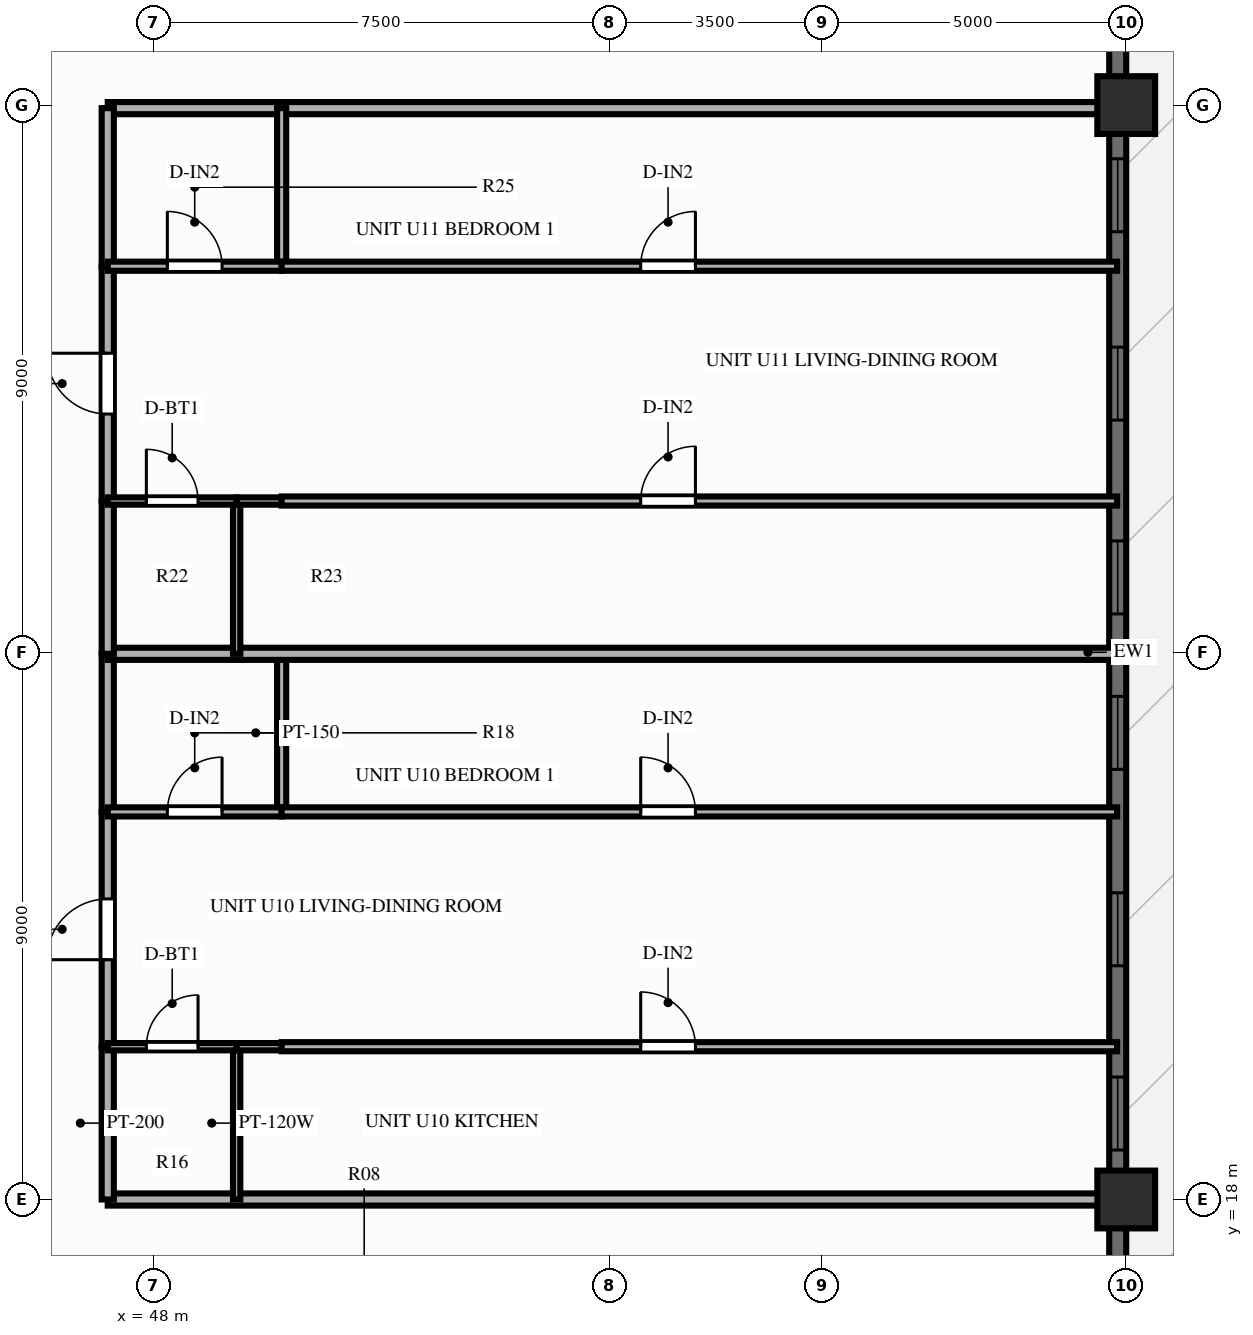
"""IFC4 building model, lengths in metres.
Left out: names, types, materials, properties, quantities, classifications, styles, units other than length and angle.
Written with IfcOpenShell. Run it as: python <this file> out.ifc"""

import sys

from ifc_helpers import new_model, si_unit, direction, frame, frame_2d, origin, origin_2d, place, context, subcontext, project, spatial, rectangle, extrude, source, transform, mapped, element, fill, save


model = new_model("IFC4")
c1 = context("Model", 3, precision=1e-05, world=origin(), true_north=direction((0.0, 1.0)))
c2 = subcontext(c1, "Body", "Model", "MODEL_VIEW")
j1 = project(units=[si_unit("LENGTHUNIT", "METRE"), si_unit("PLANEANGLEUNIT", "RADIAN")], contexts=[c1])
p1 = place(None, origin())
s1 = spatial("IfcSite", under=j1, at=p1, CompositionType="ELEMENT")
p2 = place(p1, origin())
s2 = spatial("IfcBuilding", under=s1, at=p2, CompositionType="ELEMENT")
p3 = place(p2, frame((0.0, 0.0, 80.85)))
s3 = spatial("IfcBuildingStorey", under=s2, at=p3, CompositionType="ELEMENT", Elevation=80.85)
m1 = source(origin(), c2, "Body", "SweptSolid", [
    extrude(rectangle(XDim=0.95, YDim=0.95, at=origin_2d()), origin(), (0.0, 0.0, 1.0), 3.0),
])
for number, where, z_axis, x_axis in (
    (1, (64.0, 18.0, 0.0), (0.0, 0.0, 1.0), (1.0, 0.0, 0.0)),
    (2, (64.0, 36.0, 0.0), (0.0, 0.0, 1.0), (1.0, 0.0, 0.0)),
):
    element("IfcColumn", number, at=place(p3, frame(where, z_axis=z_axis, x_axis=x_axis)), inside=s3, PredefinedType="COLUMN", context=c2, shape_type="MappedRepresentation", body=[
        mapped(m1, transform((0.0, 0.0, 0.0), scale=1.0)),
    ])
p4 = place(p3, frame((63.86, 7.2, 0.0), z_axis=(0.0, 0.0, 1.0), x_axis=(0.0, 1.0, 0.0)))
e3 = element("IfcWall", 3, at=p4, inside=s3, PredefinedType="SOLIDWALL", context=c2, shape_type="SweptSolid", body=[
    extrude(rectangle(XDim=39.6, YDim=0.28, at=frame_2d((19.8, 0.0))), origin(), (0.0, 0.0, 1.0), 2.28),
])
p5 = place(p4, frame((6.2, 0.0, 0.0), z_axis=(0.0, 0.0, 1.0), x_axis=(-1.0, 0.0, 0.0)))
e4 = element("IfcOpeningElement", 4, at=p5, cuts=e3, PredefinedType="OPENING", context=c2, shape_type="SweptSolid", body=[
    extrude(rectangle(XDim=1.6, YDim=2.15, at=frame_2d((0.8, 1.075))), frame((0.0, 0.152, 0.0), z_axis=(0.0, -1.0, 0.0), x_axis=(1.0, 0.0, 0.0)), (0.0, 0.0, 1.0), 0.304),
])
p6 = place(p4, frame((11.614, 0.0, 0.25)))
e5 = element("IfcOpeningElement", 5, at=p6, cuts=e3, PredefinedType="OPENING", context=c2, shape_type="SweptSolid", body=[
    extrude(rectangle(XDim=1.2, YDim=1.5, at=frame_2d((0.6, 0.75))), frame((0.0, 0.152, 0.0), z_axis=(0.0, -1.0, 0.0), x_axis=(1.0, 0.0, 0.0)), (0.0, 0.0, 1.0), 0.304),
])
p7 = place(p4, frame((14.644, 0.0, 0.25)))
e6 = element("IfcOpeningElement", 6, at=p7, cuts=e3, PredefinedType="OPENING", context=c2, shape_type="SweptSolid", body=[
    extrude(rectangle(XDim=1.2, YDim=1.5, at=frame_2d((0.6, 0.75))), frame((0.0, 0.152, 0.0), z_axis=(0.0, -1.0, 0.0), x_axis=(1.0, 0.0, 0.0)), (0.0, 0.0, 1.0), 0.304),
])
p8 = place(p4, frame((17.875, 0.0, 0.25)))
e7 = element("IfcOpeningElement", 7, at=p8, cuts=e3, PredefinedType="OPENING", context=c2, shape_type="SweptSolid", body=[
    extrude(rectangle(XDim=1.2, YDim=1.5, at=frame_2d((0.6, 0.75))), frame((0.0, 0.152, 0.0), z_axis=(0.0, -1.0, 0.0), x_axis=(1.0, 0.0, 0.0)), (0.0, 0.0, 1.0), 0.304),
])
p9 = place(p4, frame((20.431, 0.0, 0.25)))
e8 = element("IfcOpeningElement", 8, at=p9, cuts=e3, PredefinedType="OPENING", context=c2, shape_type="SweptSolid", body=[
    extrude(rectangle(XDim=1.2, YDim=1.5, at=frame_2d((0.6, 0.75))), frame((0.0, 0.152, 0.0), z_axis=(0.0, -1.0, 0.0), x_axis=(1.0, 0.0, 0.0)), (0.0, 0.0, 1.0), 0.304),
])
p10 = place(p4, frame((23.619, 0.0, 0.25)))
e9 = element("IfcOpeningElement", 9, at=p10, cuts=e3, PredefinedType="OPENING", context=c2, shape_type="SweptSolid", body=[
    extrude(rectangle(XDim=1.2, YDim=1.5, at=frame_2d((0.6, 0.75))), frame((0.0, 0.152, 0.0), z_axis=(0.0, -1.0, 0.0), x_axis=(1.0, 0.0, 0.0)), (0.0, 0.0, 1.0), 0.304),
])
p11 = place(p4, frame((26.718, 0.0, 0.25)))
e10 = element("IfcOpeningElement", 10, at=p11, cuts=e3, PredefinedType="OPENING", context=c2, shape_type="SweptSolid", body=[
    extrude(rectangle(XDim=1.2, YDim=1.5, at=frame_2d((0.6, 0.75))), frame((0.0, 0.152, 0.0), z_axis=(0.0, -1.0, 0.0), x_axis=(1.0, 0.0, 0.0)), (0.0, 0.0, 1.0), 0.304),
])
p12 = place(p4, frame((33.6, 0.0, 0.25)))
e11 = element("IfcOpeningElement", 11, at=p12, cuts=e3, PredefinedType="OPENING", context=c2, shape_type="SweptSolid", body=[
    extrude(rectangle(XDim=1.2, YDim=1.5, at=frame_2d((0.6, 0.75))), frame((0.0, 0.152, 0.0), z_axis=(0.0, -1.0, 0.0), x_axis=(1.0, 0.0, 0.0)), (0.0, 0.0, 1.0), 0.304),
])
for number, where, z_axis, x_axis in (
    (12, (47.25, 18.0, 0.0), (0.0, 0.0, 1.0), (1.0, 0.0, 0.0)),
    (13, (47.25, 35.95, 0.0), (0.0, 0.0, 1.0), (1.0, 0.0, 0.0)),
):
    element("IfcWall", number, at=place(p3, frame(where, z_axis=z_axis, x_axis=x_axis)), inside=s3, PredefinedType="PARTITIONING", context=c2, shape_type="SweptSolid", body=[
        extrude(rectangle(XDim=16.6, YDim=0.2, at=frame_2d((8.3, 0.0))), origin(), (0.0, 0.0, 1.0), 2.34),
    ])
p13 = place(p3, frame((47.25, 18.0, 0.0), z_axis=(0.0, 0.0, 1.0), x_axis=(0.0, 1.0, 0.0)))
e14 = element("IfcWall", 14, at=p13, inside=s3, PredefinedType="PARTITIONING", context=c2, shape_type="SweptSolid", body=[
    extrude(rectangle(XDim=2.513, YDim=0.2, at=frame_2d((1.256, 0.0))), origin(), (0.0, 0.0, 1.0), 2.79),
])
p14 = place(p3, frame((47.25, 20.513, 0.0), z_axis=(0.0, 0.0, 1.0), x_axis=(0.0, 1.0, 0.0)))
e15 = element("IfcWall", 15, at=p14, inside=s3, PredefinedType="PARTITIONING", context=c2, shape_type="SweptSolid", body=[
    extrude(rectangle(XDim=3.862, YDim=0.2, at=frame_2d((1.931, 0.0))), origin(), (0.0, 0.0, 1.0), 2.79),
])
p15 = place(p14, frame((1.431, 0.0, 0.0)))
e16 = element("IfcOpeningElement", 16, at=p15, cuts=e15, PredefinedType="OPENING", context=c2, shape_type="SweptSolid", body=[
    extrude(rectangle(XDim=1.0, YDim=2.15, at=frame_2d((0.5, 1.075))), frame((0.0, 0.112, 0.0), z_axis=(0.0, -1.0, 0.0), x_axis=(1.0, 0.0, 0.0)), (0.0, 0.0, 1.0), 0.224),
])
p16 = place(p3, frame((47.25, 24.375, 0.0), z_axis=(0.0, 0.0, 1.0), x_axis=(0.0, 1.0, 0.0)))
e17 = element("IfcWall", 17, at=p16, inside=s3, PredefinedType="PARTITIONING", context=c2, shape_type="SweptSolid", body=[
    extrude(rectangle(XDim=2.6, YDim=0.2, at=frame_2d((1.3, 0.0))), origin(), (0.0, 0.0, 1.0), 2.79),
])
p17 = place(p3, frame((49.37, 18.0, 0.0), z_axis=(0.0, 0.0, 1.0), x_axis=(0.0, 1.0, 0.0)))
e18 = element("IfcWall", 18, at=p17, inside=s3, PredefinedType="PARTITIONING", context=c2, shape_type="SweptSolid", body=[
    extrude(rectangle(XDim=2.513, YDim=0.12, at=frame_2d((1.256, 0.0))), origin(), (0.0, 0.0, 1.0), 2.79),
])
p18 = place(p3, frame((50.11, 24.375, 0.0), z_axis=(0.0, 0.0, 1.0), x_axis=(0.0, 1.0, 0.0)))
e19 = element("IfcWall", 19, at=p18, inside=s3, PredefinedType="PARTITIONING", context=c2, shape_type="SweptSolid", body=[
    extrude(rectangle(XDim=2.6, YDim=0.15, at=frame_2d((1.3, 0.0))), origin(), (0.0, 0.0, 1.0), 2.79),
])
p19 = place(p3, frame((47.25, 20.513, 0.0), z_axis=(0.0, 0.0, 1.0), x_axis=(1.0, 0.0, 0.0)))
e20 = element("IfcWall", 20, at=p19, inside=s3, PredefinedType="PARTITIONING", context=c2, shape_type="SweptSolid", body=[
    extrude(rectangle(XDim=2.12, YDim=0.12, at=frame_2d((1.06, 0.0))), origin(), (0.0, 0.0, 1.0), 2.79),
])
p20 = place(p19, frame((0.635, 0.0, 0.0)))
e21 = element("IfcOpeningElement", 21, at=p20, cuts=e20, PredefinedType="OPENING", context=c2, shape_type="SweptSolid", body=[
    extrude(rectangle(XDim=0.85, YDim=2.05, at=frame_2d((0.425, 1.025))), frame((0.0, 0.072, 0.0), z_axis=(0.0, -1.0, 0.0), x_axis=(1.0, 0.0, 0.0)), (0.0, 0.0, 1.0), 0.144),
])
p21 = place(p3, frame((49.37, 20.513, 0.0), z_axis=(0.0, 0.0, 1.0), x_axis=(1.0, 0.0, 0.0)))
e22 = element("IfcWall", 22, at=p21, inside=s3, PredefinedType="PARTITIONING", context=c2, shape_type="SweptSolid", body=[
    extrude(rectangle(XDim=0.74, YDim=0.12, at=frame_2d((0.37, 0.0))), origin(), (0.0, 0.0, 1.0), 2.79),
])
p22 = place(p3, frame((50.11, 20.513, 0.0), z_axis=(0.0, 0.0, 1.0), x_axis=(1.0, 0.0, 0.0)))
e23 = element("IfcWall", 23, at=p22, inside=s3, PredefinedType="PARTITIONING", context=c2, shape_type="SweptSolid", body=[
    extrude(rectangle(XDim=13.74, YDim=0.15, at=frame_2d((6.87, 0.0))), origin(), (0.0, 0.0, 1.0), 2.79),
])
p23 = place(p22, frame((5.905, 0.0, 0.0)))
e24 = element("IfcOpeningElement", 24, at=p23, cuts=e23, PredefinedType="OPENING", context=c2, shape_type="SweptSolid", body=[
    extrude(rectangle(XDim=0.9, YDim=2.1, at=frame_2d((0.45, 1.05))), frame((0.0, 0.087, 0.0), z_axis=(0.0, -1.0, 0.0), x_axis=(1.0, 0.0, 0.0)), (0.0, 0.0, 1.0), 0.174),
])
p24 = place(p3, frame((47.25, 24.375, 0.0), z_axis=(0.0, 0.0, 1.0), x_axis=(1.0, 0.0, 0.0)))
e25 = element("IfcWall", 25, at=p24, inside=s3, PredefinedType="PARTITIONING", context=c2, shape_type="SweptSolid", body=[
    extrude(rectangle(XDim=2.86, YDim=0.15, at=frame_2d((1.43, 0.0))), origin(), (0.0, 0.0, 1.0), 2.79),
])
p25 = place(p24, frame((0.98, 0.0, 0.0)))
e26 = element("IfcOpeningElement", 26, at=p25, cuts=e25, PredefinedType="OPENING", context=c2, shape_type="SweptSolid", body=[
    extrude(rectangle(XDim=0.9, YDim=2.1, at=frame_2d((0.45, 1.05))), frame((0.0, 0.087, 0.0), z_axis=(0.0, -1.0, 0.0), x_axis=(1.0, 0.0, 0.0)), (0.0, 0.0, 1.0), 0.174),
])
p26 = place(p3, frame((50.11, 24.375, 0.0), z_axis=(0.0, 0.0, 1.0), x_axis=(1.0, 0.0, 0.0)))
e27 = element("IfcWall", 27, at=p26, inside=s3, PredefinedType="PARTITIONING", context=c2, shape_type="SweptSolid", body=[
    extrude(rectangle(XDim=13.74, YDim=0.15, at=frame_2d((6.87, 0.0))), origin(), (0.0, 0.0, 1.0), 2.79),
])
p27 = place(p26, frame((5.905, 0.0, 0.0)))
e28 = element("IfcOpeningElement", 28, at=p27, cuts=e27, PredefinedType="OPENING", context=c2, shape_type="SweptSolid", body=[
    extrude(rectangle(XDim=0.9, YDim=2.1, at=frame_2d((0.45, 1.05))), frame((0.0, 0.087, 0.0), z_axis=(0.0, -1.0, 0.0), x_axis=(1.0, 0.0, 0.0)), (0.0, 0.0, 1.0), 0.174),
])
p28 = place(p3, frame((47.25, 26.975, 0.0), z_axis=(0.0, 0.0, 1.0), x_axis=(1.0, 0.0, 0.0)))
e29 = element("IfcWall", 29, at=p28, inside=s3, PredefinedType="PARTITIONING", context=c2, shape_type="SweptSolid", body=[
    extrude(rectangle(XDim=16.6, YDim=0.2, at=frame_2d((8.3, 0.0))), origin(), (0.0, 0.0, 1.0), 2.79),
])
p29 = place(p3, frame((47.25, 26.975, 0.0), z_axis=(0.0, 0.0, 1.0), x_axis=(0.0, 1.0, 0.0)))
e30 = element("IfcWall", 30, at=p29, inside=s3, PredefinedType="PARTITIONING", context=c2, shape_type="SweptSolid", body=[
    extrude(rectangle(XDim=2.513, YDim=0.2, at=frame_2d((1.256, 0.0))), origin(), (0.0, 0.0, 1.0), 2.79),
])
p30 = place(p3, frame((47.25, 29.488, 0.0), z_axis=(0.0, 0.0, 1.0), x_axis=(0.0, 1.0, 0.0)))
e31 = element("IfcWall", 31, at=p30, inside=s3, PredefinedType="PARTITIONING", context=c2, shape_type="SweptSolid", body=[
    extrude(rectangle(XDim=3.862, YDim=0.2, at=frame_2d((1.931, 0.0))), origin(), (0.0, 0.0, 1.0), 2.79),
])
p31 = place(p30, frame((1.431, 0.0, 0.0)))
e32 = element("IfcOpeningElement", 32, at=p31, cuts=e31, PredefinedType="OPENING", context=c2, shape_type="SweptSolid", body=[
    extrude(rectangle(XDim=1.0, YDim=2.15, at=frame_2d((0.5, 1.075))), frame((0.0, 0.112, 0.0), z_axis=(0.0, -1.0, 0.0), x_axis=(1.0, 0.0, 0.0)), (0.0, 0.0, 1.0), 0.224),
])
p32 = place(p3, frame((47.25, 33.35, 0.0), z_axis=(0.0, 0.0, 1.0), x_axis=(0.0, 1.0, 0.0)))
e33 = element("IfcWall", 33, at=p32, inside=s3, PredefinedType="PARTITIONING", context=c2, shape_type="SweptSolid", body=[
    extrude(rectangle(XDim=2.6, YDim=0.2, at=frame_2d((1.3, 0.0))), origin(), (0.0, 0.0, 1.0), 2.79),
])
p33 = place(p3, frame((49.37, 26.975, 0.0), z_axis=(0.0, 0.0, 1.0), x_axis=(0.0, 1.0, 0.0)))
e34 = element("IfcWall", 34, at=p33, inside=s3, PredefinedType="PARTITIONING", context=c2, shape_type="SweptSolid", body=[
    extrude(rectangle(XDim=2.513, YDim=0.12, at=frame_2d((1.256, 0.0))), origin(), (0.0, 0.0, 1.0), 2.79),
])
p34 = place(p3, frame((50.11, 33.35, 0.0), z_axis=(0.0, 0.0, 1.0), x_axis=(0.0, 1.0, 0.0)))
e35 = element("IfcWall", 35, at=p34, inside=s3, PredefinedType="PARTITIONING", context=c2, shape_type="SweptSolid", body=[
    extrude(rectangle(XDim=2.6, YDim=0.15, at=frame_2d((1.3, 0.0))), origin(), (0.0, 0.0, 1.0), 2.79),
])
p35 = place(p3, frame((47.25, 29.488, 0.0), z_axis=(0.0, 0.0, 1.0), x_axis=(1.0, 0.0, 0.0)))
e36 = element("IfcWall", 36, at=p35, inside=s3, PredefinedType="PARTITIONING", context=c2, shape_type="SweptSolid", body=[
    extrude(rectangle(XDim=2.12, YDim=0.12, at=frame_2d((1.06, 0.0))), origin(), (0.0, 0.0, 1.0), 2.79),
])
p36 = place(p35, frame((0.635, 0.0, 0.0)))
e37 = element("IfcOpeningElement", 37, at=p36, cuts=e36, PredefinedType="OPENING", context=c2, shape_type="SweptSolid", body=[
    extrude(rectangle(XDim=0.85, YDim=2.05, at=frame_2d((0.425, 1.025))), frame((0.0, 0.072, 0.0), z_axis=(0.0, -1.0, 0.0), x_axis=(1.0, 0.0, 0.0)), (0.0, 0.0, 1.0), 0.144),
])
p37 = place(p3, frame((49.37, 29.488, 0.0), z_axis=(0.0, 0.0, 1.0), x_axis=(1.0, 0.0, 0.0)))
e38 = element("IfcWall", 38, at=p37, inside=s3, PredefinedType="PARTITIONING", context=c2, shape_type="SweptSolid", body=[
    extrude(rectangle(XDim=0.74, YDim=0.12, at=frame_2d((0.37, 0.0))), origin(), (0.0, 0.0, 1.0), 2.79),
])
p38 = place(p3, frame((50.11, 29.488, 0.0), z_axis=(0.0, 0.0, 1.0), x_axis=(1.0, 0.0, 0.0)))
e39 = element("IfcWall", 39, at=p38, inside=s3, PredefinedType="PARTITIONING", context=c2, shape_type="SweptSolid", body=[
    extrude(rectangle(XDim=13.74, YDim=0.15, at=frame_2d((6.87, 0.0))), origin(), (0.0, 0.0, 1.0), 2.79),
])
p39 = place(p38, frame((5.905, 0.0, 0.0)))
e40 = element("IfcOpeningElement", 40, at=p39, cuts=e39, PredefinedType="OPENING", context=c2, shape_type="SweptSolid", body=[
    extrude(rectangle(XDim=0.9, YDim=2.1, at=frame_2d((0.45, 1.05))), frame((0.0, 0.087, 0.0), z_axis=(0.0, -1.0, 0.0), x_axis=(1.0, 0.0, 0.0)), (0.0, 0.0, 1.0), 0.174),
])
p40 = place(p3, frame((47.25, 33.35, 0.0), z_axis=(0.0, 0.0, 1.0), x_axis=(1.0, 0.0, 0.0)))
e41 = element("IfcWall", 41, at=p40, inside=s3, PredefinedType="PARTITIONING", context=c2, shape_type="SweptSolid", body=[
    extrude(rectangle(XDim=2.86, YDim=0.15, at=frame_2d((1.43, 0.0))), origin(), (0.0, 0.0, 1.0), 2.79),
])
p41 = place(p40, frame((0.98, 0.0, 0.0)))
e42 = element("IfcOpeningElement", 42, at=p41, cuts=e41, PredefinedType="OPENING", context=c2, shape_type="SweptSolid", body=[
    extrude(rectangle(XDim=0.9, YDim=2.1, at=frame_2d((0.45, 1.05))), frame((0.0, 0.087, 0.0), z_axis=(0.0, -1.0, 0.0), x_axis=(1.0, 0.0, 0.0)), (0.0, 0.0, 1.0), 0.174),
])
p42 = place(p3, frame((50.11, 33.35, 0.0), z_axis=(0.0, 0.0, 1.0), x_axis=(1.0, 0.0, 0.0)))
e43 = element("IfcWall", 43, at=p42, inside=s3, PredefinedType="PARTITIONING", context=c2, shape_type="SweptSolid", body=[
    extrude(rectangle(XDim=13.74, YDim=0.15, at=frame_2d((6.87, 0.0))), origin(), (0.0, 0.0, 1.0), 2.79),
])
p43 = place(p42, frame((5.905, 0.0, 0.0)))
e44 = element("IfcOpeningElement", 44, at=p43, cuts=e43, PredefinedType="OPENING", context=c2, shape_type="SweptSolid", body=[
    extrude(rectangle(XDim=0.9, YDim=2.1, at=frame_2d((0.45, 1.05))), frame((0.0, 0.087, 0.0), z_axis=(0.0, -1.0, 0.0), x_axis=(1.0, 0.0, 0.0)), (0.0, 0.0, 1.0), 0.174),
])
m2 = source(origin(), c2, "Body", "SweptSolid", [
    extrude(rectangle(XDim=1.2, YDim=1.5, at=frame_2d((0.6, 0.75))), frame((0.0, 0.03, 0.0), z_axis=(0.0, -1.0, 0.0), x_axis=(1.0, 0.0, 0.0)), (0.0, 0.0, 1.0), 0.06),
])
p44 = place(p6, origin())
e45 = element("IfcWindow", 45, at=p44, inside=s3, PartitioningType="SINGLE_PANEL", PredefinedType="WINDOW", context=c2, shape_type="MappedRepresentation", body=[
    mapped(m2, transform((0.0, 0.0, 0.0), scale=1.0)),
])
fill(e5, e45)
p45 = place(p7, origin())
e46 = element("IfcWindow", 46, at=p45, inside=s3, PartitioningType="SINGLE_PANEL", PredefinedType="WINDOW", context=c2, shape_type="MappedRepresentation", body=[
    mapped(m2, transform((0.0, 0.0, 0.0), scale=1.0)),
])
fill(e6, e46)
p46 = place(p8, origin())
e47 = element("IfcWindow", 47, at=p46, inside=s3, PartitioningType="SINGLE_PANEL", PredefinedType="WINDOW", context=c2, shape_type="MappedRepresentation", body=[
    mapped(m2, transform((0.0, 0.0, 0.0), scale=1.0)),
])
fill(e7, e47)
p47 = place(p9, origin())
e48 = element("IfcWindow", 48, at=p47, inside=s3, PartitioningType="SINGLE_PANEL", PredefinedType="WINDOW", context=c2, shape_type="MappedRepresentation", body=[
    mapped(m2, transform((0.0, 0.0, 0.0), scale=1.0)),
])
fill(e8, e48)
p48 = place(p10, origin())
e49 = element("IfcWindow", 49, at=p48, inside=s3, PartitioningType="SINGLE_PANEL", PredefinedType="WINDOW", context=c2, shape_type="MappedRepresentation", body=[
    mapped(m2, transform((0.0, 0.0, 0.0), scale=1.0)),
])
fill(e9, e49)
p49 = place(p11, origin())
e50 = element("IfcWindow", 50, at=p49, inside=s3, PartitioningType="SINGLE_PANEL", PredefinedType="WINDOW", context=c2, shape_type="MappedRepresentation", body=[
    mapped(m2, transform((0.0, 0.0, 0.0), scale=1.0)),
])
fill(e10, e50)
m3 = source(origin(), c2, "Body", "SweptSolid", [
    extrude(rectangle(XDim=1.0, YDim=2.15, at=frame_2d((0.5, 1.075))), frame((0.0, 0.025, 0.0), z_axis=(0.0, -1.0, 0.0), x_axis=(1.0, 0.0, 0.0)), (0.0, 0.0, 1.0), 0.05),
])
p50 = place(p15, origin())
e51 = element("IfcDoor", 51, at=p50, inside=s3, OperationType="SINGLE_SWING_LEFT", PredefinedType="DOOR", context=c2, shape_type="MappedRepresentation", body=[
    mapped(m3, transform((0.0, 0.0, 0.0), scale=1.0)),
])
fill(e16, e51)
m4 = source(origin(), c2, "Body", "SweptSolid", [
    extrude(rectangle(XDim=0.85, YDim=2.05, at=frame_2d((0.425, 1.025))), frame((0.0, 0.025, 0.0), z_axis=(0.0, -1.0, 0.0), x_axis=(1.0, 0.0, 0.0)), (0.0, 0.0, 1.0), 0.05),
])
p51 = place(p20, origin())
e52 = element("IfcDoor", 52, at=p51, inside=s3, OperationType="SINGLE_SWING_RIGHT", PredefinedType="DOOR", context=c2, shape_type="MappedRepresentation", body=[
    mapped(m4, transform((0.0, 0.0, 0.0), scale=1.0)),
])
fill(e21, e52)
m5 = source(origin(), c2, "Body", "SweptSolid", [
    extrude(rectangle(XDim=0.9, YDim=2.1, at=frame_2d((0.45, 1.05))), frame((0.0, 0.025, 0.0), z_axis=(0.0, -1.0, 0.0), x_axis=(1.0, 0.0, 0.0)), (0.0, 0.0, 1.0), 0.05),
])
p52 = place(p23, origin())
e53 = element("IfcDoor", 53, at=p52, inside=s3, OperationType="SINGLE_SWING_LEFT", PredefinedType="DOOR", context=c2, shape_type="MappedRepresentation", body=[
    mapped(m5, transform((0.0, 0.0, 0.0), scale=1.0)),
])
fill(e24, e53)
p53 = place(p25, origin())
e54 = element("IfcDoor", 54, at=p53, inside=s3, OperationType="SINGLE_SWING_RIGHT", PredefinedType="DOOR", context=c2, shape_type="MappedRepresentation", body=[
    mapped(m5, transform((0.0, 0.0, 0.0), scale=1.0)),
])
fill(e26, e54)
p54 = place(p27, origin())
e55 = element("IfcDoor", 55, at=p54, inside=s3, OperationType="SINGLE_SWING_LEFT", PredefinedType="DOOR", context=c2, shape_type="MappedRepresentation", body=[
    mapped(m5, transform((0.0, 0.0, 0.0), scale=1.0)),
])
fill(e28, e55)
p55 = place(p31, origin())
e56 = element("IfcDoor", 56, at=p55, inside=s3, OperationType="SINGLE_SWING_RIGHT", PredefinedType="DOOR", context=c2, shape_type="MappedRepresentation", body=[
    mapped(m3, transform((0.0, 0.0, 0.0), scale=1.0)),
])
fill(e32, e56)
p56 = place(p36, origin())
e57 = element("IfcDoor", 57, at=p56, inside=s3, OperationType="SINGLE_SWING_LEFT", PredefinedType="DOOR", context=c2, shape_type="MappedRepresentation", body=[
    mapped(m4, transform((0.0, 0.0, 0.0), scale=1.0)),
])
fill(e37, e57)
p57 = place(p39, origin())
e58 = element("IfcDoor", 58, at=p57, inside=s3, OperationType="SINGLE_SWING_RIGHT", PredefinedType="DOOR", context=c2, shape_type="MappedRepresentation", body=[
    mapped(m5, transform((0.0, 0.0, 0.0), scale=1.0)),
])
fill(e40, e58)
p58 = place(p41, origin())
e59 = element("IfcDoor", 59, at=p58, inside=s3, OperationType="SINGLE_SWING_LEFT", PredefinedType="DOOR", context=c2, shape_type="MappedRepresentation", body=[
    mapped(m5, transform((0.0, 0.0, 0.0), scale=1.0)),
])
fill(e42, e59)
p59 = place(p43, origin())
e60 = element("IfcDoor", 60, at=p59, inside=s3, OperationType="SINGLE_SWING_RIGHT", PredefinedType="DOOR", context=c2, shape_type="MappedRepresentation", body=[
    mapped(m5, transform((0.0, 0.0, 0.0), scale=1.0)),
])
fill(e44, e60)
save(model, sys.argv[1])
